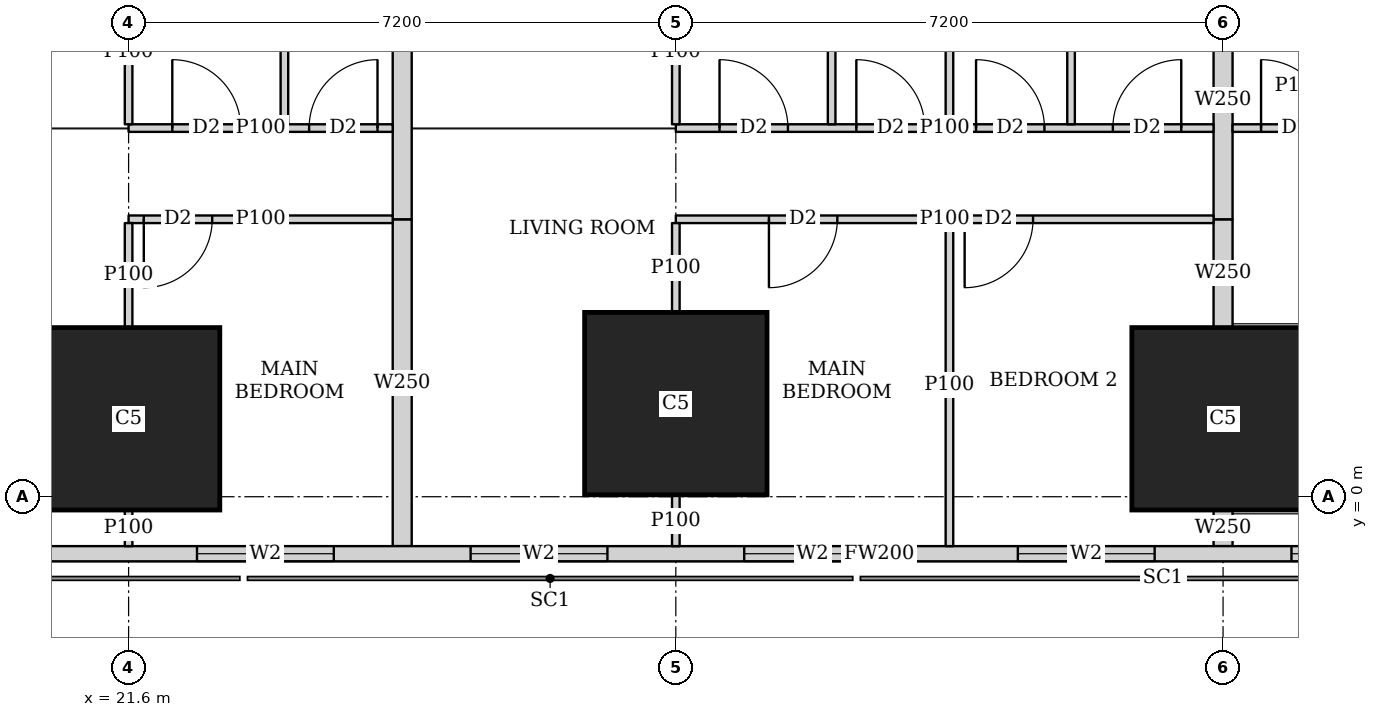
"""IFC4 building model, lengths in metres.
Left out: names, types, materials, properties, quantities, classifications, styles, units other than length and angle.
Written with IfcOpenShell. Run it as: python <this file> out.ifc"""

import sys

from ifc_helpers import new_model, si_unit, direction, frame, frame_2d, origin, origin_2d, place, context, subcontext, project, spatial, rectangle, extrude, element, fill, save


model = new_model("IFC4")
c1 = context("Model", 3, precision=1e-05, world=origin(), true_north=direction((0.0, 1.0)))
c2 = subcontext(c1, "Body", "Model", "MODEL_VIEW")
j1 = project(units=[si_unit("LENGTHUNIT", "METRE"), si_unit("PLANEANGLEUNIT", "RADIAN")], contexts=[c1])
p1 = place(None, origin())
s1 = spatial("IfcSite", under=j1, at=p1, CompositionType="ELEMENT")
p2 = place(p1, origin())
s2 = spatial("IfcBuilding", under=s1, at=p2, CompositionType="ELEMENT")
p3 = place(p2, frame((0.0, 0.0, 223.7)))
s3 = spatial("IfcBuildingStorey", under=s2, at=p3, CompositionType="ELEMENT", Elevation=223.7)
for number, where, z_axis, x_axis in (
    (1, (21.6, 1.025, 0.0), (0.0, 0.0, 1.0), (1.0, 0.0, 0.0)),
    (2, (28.8, 1.225, 0.0), (0.0, 0.0, 1.0), (1.0, 0.0, 0.0)),
    (3, (36.0, 1.025, 0.0), (0.0, 0.0, 1.0), (1.0, 0.0, 0.0)),
):
    element("IfcColumn", number, at=place(p3, frame(where, z_axis=z_axis, x_axis=x_axis)), inside=s3, PredefinedType="COLUMN", context=c2, shape_type="SweptSolid", body=[
        extrude(rectangle(XDim=2.4, YDim=2.4, at=origin_2d()), origin(), (0.0, 0.0, 1.0), 3.75),
    ])
p4 = place(p3, frame((14.563, -0.75, 0.0), z_axis=(0.0, 0.0, 1.0), x_axis=(1.0, 0.0, 0.0)))
e4 = element("IfcWall", 4, at=p4, inside=s3, PredefinedType="SOLIDWALL", context=c2, shape_type="SweptSolid", body=[
    extrude(rectangle(XDim=33.228, YDim=0.2, at=frame_2d((16.614, 0.0))), origin(), (0.0, 0.0, 1.0), 3.5),
])
p5 = place(p4, frame((2.319, 0.0, 0.9)))
e5 = element("IfcOpeningElement", 5, at=p5, cuts=e4, PredefinedType="OPENING", context=c2, shape_type="SweptSolid", body=[
    extrude(rectangle(XDim=2.4, YDim=1.5, at=frame_2d((1.2, 0.75))), frame((0.0, 0.11, 0.0), z_axis=(0.0, -1.0, 0.0), x_axis=(1.0, 0.0, 0.0)), (0.0, 0.0, 1.0), 0.22),
])
p6 = place(p4, frame((7.937, 0.0, 0.9)))
e6 = element("IfcOpeningElement", 6, at=p6, cuts=e4, PredefinedType="OPENING", context=c2, shape_type="SweptSolid", body=[
    extrude(rectangle(XDim=1.8, YDim=1.5, at=frame_2d((0.9, 0.75))), frame((0.0, 0.11, 0.0), z_axis=(0.0, -1.0, 0.0), x_axis=(1.0, 0.0, 0.0)), (0.0, 0.0, 1.0), 0.22),
])
p7 = place(p4, frame((11.537, 0.0, 0.9)))
e7 = element("IfcOpeningElement", 7, at=p7, cuts=e4, PredefinedType="OPENING", context=c2, shape_type="SweptSolid", body=[
    extrude(rectangle(XDim=1.8, YDim=1.5, at=frame_2d((0.9, 0.75))), frame((0.0, 0.11, 0.0), z_axis=(0.0, -1.0, 0.0), x_axis=(1.0, 0.0, 0.0)), (0.0, 0.0, 1.0), 0.22),
])
p8 = place(p4, frame((15.137, 0.0, 0.9)))
e8 = element("IfcOpeningElement", 8, at=p8, cuts=e4, PredefinedType="OPENING", context=c2, shape_type="SweptSolid", body=[
    extrude(rectangle(XDim=1.8, YDim=1.5, at=frame_2d((0.9, 0.75))), frame((0.0, 0.11, 0.0), z_axis=(0.0, -1.0, 0.0), x_axis=(1.0, 0.0, 0.0)), (0.0, 0.0, 1.0), 0.22),
])
p9 = place(p4, frame((18.737, 0.0, 0.9)))
e9 = element("IfcOpeningElement", 9, at=p9, cuts=e4, PredefinedType="OPENING", context=c2, shape_type="SweptSolid", body=[
    extrude(rectangle(XDim=1.8, YDim=1.5, at=frame_2d((0.9, 0.75))), frame((0.0, 0.11, 0.0), z_axis=(0.0, -1.0, 0.0), x_axis=(1.0, 0.0, 0.0)), (0.0, 0.0, 1.0), 0.22),
])
p10 = place(p4, frame((22.337, 0.0, 0.9)))
e10 = element("IfcOpeningElement", 10, at=p10, cuts=e4, PredefinedType="OPENING", context=c2, shape_type="SweptSolid", body=[
    extrude(rectangle(XDim=1.8, YDim=1.5, at=frame_2d((0.9, 0.75))), frame((0.0, 0.11, 0.0), z_axis=(0.0, -1.0, 0.0), x_axis=(1.0, 0.0, 0.0)), (0.0, 0.0, 1.0), 0.22),
])
p11 = place(p3, frame((33.68, 42.723, 0.0), z_axis=(0.0, 0.0, 1.0), x_axis=(0.185601160014, -0.982625162207, 0.0)))
e11 = element("IfcWall", 11, at=p11, inside=s3, PredefinedType="SOLIDWALL", context=c2, shape_type="SweptSolid", body=[
    extrude(rectangle(XDim=41.051, YDim=0.15, at=frame_2d((20.526, 0.0))), origin(), (0.0, 0.0, 1.0), 2.5),
])
p12 = place(p11, frame((16.123, 0.0, 0.0)))
e12 = element("IfcOpeningElement", 12, at=p12, cuts=e11, PredefinedType="OPENING", context=c2, shape_type="SweptSolid", body=[
    extrude(rectangle(XDim=1.0, YDim=2.1, at=frame_2d((0.5, 1.05))), frame((0.0, 0.085, 0.0), z_axis=(0.0, -1.0, 0.0), x_axis=(1.0, 0.0, 0.0)), (0.0, 0.0, 1.0), 0.17),
])
p13 = place(p11, frame((19.938, 0.0, 0.0)))
e13 = element("IfcOpeningElement", 13, at=p13, cuts=e11, PredefinedType="OPENING", context=c2, shape_type="SweptSolid", body=[
    extrude(rectangle(XDim=1.0, YDim=2.1, at=frame_2d((0.5, 1.05))), frame((0.0, 0.085, 0.0), z_axis=(0.0, -1.0, 0.0), x_axis=(1.0, 0.0, 0.0)), (0.0, 0.0, 1.0), 0.17),
])
p14 = place(p11, frame((30.902, 0.0, 0.0)))
e14 = element("IfcOpeningElement", 14, at=p14, cuts=e11, PredefinedType="OPENING", context=c2, shape_type="SweptSolid", body=[
    extrude(rectangle(XDim=1.0, YDim=2.1, at=frame_2d((0.5, 1.05))), frame((0.0, 0.085, 0.0), z_axis=(0.0, -1.0, 0.0), x_axis=(1.0, 0.0, 0.0)), (0.0, 0.0, 1.0), 0.17),
])
p15 = place(p3, frame((25.075, 3.65, 0.0), z_axis=(0.0, 0.0, 1.0), x_axis=(-1.0, 0.0, 0.0)))
e15 = element("IfcWall", 15, at=p15, inside=s3, PredefinedType="PARTITIONING", context=c2, shape_type="SweptSolid", body=[
    extrude(rectangle(XDim=3.475, YDim=0.1, at=frame_2d((1.737, 0.0))), origin(), (0.0, 0.0, 1.0), 3.5),
])
p16 = place(p15, frame((2.375, 0.0, 0.0)))
e16 = element("IfcOpeningElement", 16, at=p16, cuts=e15, PredefinedType="OPENING", context=c2, shape_type="SweptSolid", body=[
    extrude(rectangle(XDim=0.9, YDim=2.1, at=frame_2d((0.45, 1.05))), frame((0.0, 0.06, 0.0), z_axis=(0.0, -1.0, 0.0), x_axis=(1.0, 0.0, 0.0)), (0.0, 0.0, 1.0), 0.12),
])
p17 = place(p3, frame((25.075, 4.85, 0.0), z_axis=(0.0, 0.0, 1.0), x_axis=(-1.0, 0.0, 0.0)))
e17 = element("IfcWall", 17, at=p17, inside=s3, PredefinedType="PARTITIONING", context=c2, shape_type="SweptSolid", body=[
    extrude(rectangle(XDim=3.475, YDim=0.1, at=frame_2d((1.737, 0.0))), origin(), (0.0, 0.0, 1.0), 3.5),
])
p18 = place(p17, frame((2.0, 0.0, 0.0)))
e18 = element("IfcOpeningElement", 18, at=p18, cuts=e17, PredefinedType="OPENING", context=c2, shape_type="SweptSolid", body=[
    extrude(rectangle(XDim=0.9, YDim=2.1, at=frame_2d((0.45, 1.05))), frame((0.0, 0.06, 0.0), z_axis=(0.0, -1.0, 0.0), x_axis=(1.0, 0.0, 0.0)), (0.0, 0.0, 1.0), 0.12),
])
p19 = place(p17, frame((0.2, 0.0, 0.0)))
e19 = element("IfcOpeningElement", 19, at=p19, cuts=e17, PredefinedType="OPENING", context=c2, shape_type="SweptSolid", body=[
    extrude(rectangle(XDim=0.9, YDim=2.1, at=frame_2d((0.45, 1.05))), frame((0.0, 0.06, 0.0), z_axis=(0.0, -1.0, 0.0), x_axis=(1.0, 0.0, 0.0)), (0.0, 0.0, 1.0), 0.12),
])
p20 = place(p3, frame((21.6, -0.65, 0.0), z_axis=(0.0, 0.0, 1.0), x_axis=(0.0, 1.0, 0.0)))
e20 = element("IfcWall", 20, at=p20, inside=s3, PredefinedType="PARTITIONING", context=c2, shape_type="SweptSolid", body=[
    extrude(rectangle(XDim=0.474, YDim=0.1, at=frame_2d((0.237, 0.0))), origin(), (0.0, 0.0, 1.0), 3.5),
])
p21 = place(p3, frame((21.6, 2.226, 0.0), z_axis=(0.0, 0.0, 1.0), x_axis=(0.0, 1.0, 0.0)))
e21 = element("IfcWall", 21, at=p21, inside=s3, PredefinedType="PARTITIONING", context=c2, shape_type="SweptSolid", body=[
    extrude(rectangle(XDim=1.374, YDim=0.1, at=frame_2d((0.687, 0.0))), origin(), (0.0, 0.0, 1.0), 3.5),
])
p22 = place(p3, frame((21.6, 4.9, 0.0), z_axis=(0.0, 0.0, 1.0), x_axis=(0.0, 1.0, 0.0)))
e22 = element("IfcWall", 22, at=p22, inside=s3, PredefinedType="PARTITIONING", context=c2, shape_type="SweptSolid", body=[
    extrude(rectangle(XDim=1.899, YDim=0.1, at=frame_2d((0.95, 0.0))), origin(), (0.0, 0.0, 1.0), 3.5),
])
p23 = place(p3, frame((23.65, 4.9, 0.0), z_axis=(0.0, 0.0, 1.0), x_axis=(0.0, 1.0, 0.0)))
e23 = element("IfcWall", 23, at=p23, inside=s3, PredefinedType="PARTITIONING", context=c2, shape_type="SweptSolid", body=[
    extrude(rectangle(XDim=3.525, YDim=0.1, at=frame_2d((1.763, 0.0))), origin(), (0.0, 0.0, 1.0), 3.5),
])
p24 = place(p3, frame((35.875, 3.65, 0.0), z_axis=(0.0, 0.0, 1.0), x_axis=(-1.0, 0.0, 0.0)))
e24 = element("IfcWall", 24, at=p24, inside=s3, PredefinedType="PARTITIONING", context=c2, shape_type="SweptSolid", body=[
    extrude(rectangle(XDim=7.075, YDim=0.1, at=frame_2d((3.538, 0.0))), origin(), (0.0, 0.0, 1.0), 3.5),
])
p25 = place(p24, frame((4.95, 0.0, 0.0)))
e25 = element("IfcOpeningElement", 25, at=p25, cuts=e24, PredefinedType="OPENING", context=c2, shape_type="SweptSolid", body=[
    extrude(rectangle(XDim=0.9, YDim=2.1, at=frame_2d((0.45, 1.05))), frame((0.0, 0.06, 0.0), z_axis=(0.0, -1.0, 0.0), x_axis=(1.0, 0.0, 0.0)), (0.0, 0.0, 1.0), 0.12),
])
p26 = place(p24, frame((2.375, 0.0, 0.0)))
e26 = element("IfcOpeningElement", 26, at=p26, cuts=e24, PredefinedType="OPENING", context=c2, shape_type="SweptSolid", body=[
    extrude(rectangle(XDim=0.9, YDim=2.1, at=frame_2d((0.45, 1.05))), frame((0.0, 0.06, 0.0), z_axis=(0.0, -1.0, 0.0), x_axis=(1.0, 0.0, 0.0)), (0.0, 0.0, 1.0), 0.12),
])
p27 = place(p3, frame((35.875, 4.85, 0.0), z_axis=(0.0, 0.0, 1.0), x_axis=(-1.0, 0.0, 0.0)))
e27 = element("IfcWall", 27, at=p27, inside=s3, PredefinedType="PARTITIONING", context=c2, shape_type="SweptSolid", body=[
    extrude(rectangle(XDim=7.075, YDim=0.1, at=frame_2d((3.538, 0.0))), origin(), (0.0, 0.0, 1.0), 3.5),
])
p28 = place(p27, frame((5.6, 0.0, 0.0)))
e28 = element("IfcOpeningElement", 28, at=p28, cuts=e27, PredefinedType="OPENING", context=c2, shape_type="SweptSolid", body=[
    extrude(rectangle(XDim=0.9, YDim=2.1, at=frame_2d((0.45, 1.05))), frame((0.0, 0.06, 0.0), z_axis=(0.0, -1.0, 0.0), x_axis=(1.0, 0.0, 0.0)), (0.0, 0.0, 1.0), 0.12),
])
p29 = place(p27, frame((2.225, 0.0, 0.0)))
e29 = element("IfcOpeningElement", 29, at=p29, cuts=e27, PredefinedType="OPENING", context=c2, shape_type="SweptSolid", body=[
    extrude(rectangle(XDim=0.9, YDim=2.1, at=frame_2d((0.45, 1.05))), frame((0.0, 0.06, 0.0), z_axis=(0.0, -1.0, 0.0), x_axis=(1.0, 0.0, 0.0)), (0.0, 0.0, 1.0), 0.12),
])
p30 = place(p27, frame((3.8, 0.0, 0.0)))
e30 = element("IfcOpeningElement", 30, at=p30, cuts=e27, PredefinedType="OPENING", context=c2, shape_type="SweptSolid", body=[
    extrude(rectangle(XDim=0.9, YDim=2.1, at=frame_2d((0.45, 1.05))), frame((0.0, 0.06, 0.0), z_axis=(0.0, -1.0, 0.0), x_axis=(1.0, 0.0, 0.0)), (0.0, 0.0, 1.0), 0.12),
])
p31 = place(p27, frame((0.425, 0.0, 0.0)))
e31 = element("IfcOpeningElement", 31, at=p31, cuts=e27, PredefinedType="OPENING", context=c2, shape_type="SweptSolid", body=[
    extrude(rectangle(XDim=0.9, YDim=2.1, at=frame_2d((0.45, 1.05))), frame((0.0, 0.06, 0.0), z_axis=(0.0, -1.0, 0.0), x_axis=(1.0, 0.0, 0.0)), (0.0, 0.0, 1.0), 0.12),
])
p32 = place(p3, frame((28.8, -0.65, 0.0), z_axis=(0.0, 0.0, 1.0), x_axis=(0.0, 1.0, 0.0)))
e32 = element("IfcWall", 32, at=p32, inside=s3, PredefinedType="PARTITIONING", context=c2, shape_type="SweptSolid", body=[
    extrude(rectangle(XDim=0.674, YDim=0.1, at=frame_2d((0.337, 0.0))), origin(), (0.0, 0.0, 1.0), 3.5),
])
p33 = place(p3, frame((28.8, 2.426, 0.0), z_axis=(0.0, 0.0, 1.0), x_axis=(0.0, 1.0, 0.0)))
e33 = element("IfcWall", 33, at=p33, inside=s3, PredefinedType="PARTITIONING", context=c2, shape_type="SweptSolid", body=[
    extrude(rectangle(XDim=1.174, YDim=0.1, at=frame_2d((0.587, 0.0))), origin(), (0.0, 0.0, 1.0), 3.5),
])
p34 = place(p3, frame((32.4, -0.65, 0.0), z_axis=(0.0, 0.0, 1.0), x_axis=(0.0, 1.0, 0.0)))
e34 = element("IfcWall", 34, at=p34, inside=s3, PredefinedType="PARTITIONING", context=c2, shape_type="SweptSolid", body=[
    extrude(rectangle(XDim=4.25, YDim=0.1, at=frame_2d((2.125, 0.0))), origin(), (0.0, 0.0, 1.0), 2.05),
])
p35 = place(p3, frame((28.8, 4.9, 0.0), z_axis=(0.0, 0.0, 1.0), x_axis=(0.0, 1.0, 0.0)))
e35 = element("IfcWall", 35, at=p35, inside=s3, PredefinedType="PARTITIONING", context=c2, shape_type="SweptSolid", body=[
    extrude(rectangle(XDim=1.899, YDim=0.1, at=frame_2d((0.95, 0.0))), origin(), (0.0, 0.0, 1.0), 3.5),
])
for number, where, z_axis, x_axis in (
    (36, (32.4, 4.9, 0.0), (0.0, 0.0, 1.0), (0.0, 1.0, 0.0)),
    (37, (30.85, 4.9, 0.0), (0.0, 0.0, 1.0), (0.0, 1.0, 0.0)),
    (38, (34.0, 4.9, 0.0), (0.0, 0.0, 1.0), (0.0, 1.0, 0.0)),
):
    element("IfcWall", number, at=place(p3, frame(where, z_axis=z_axis, x_axis=x_axis)), inside=s3, PredefinedType="PARTITIONING", context=c2, shape_type="SweptSolid", body=[
        extrude(rectangle(XDim=3.525, YDim=0.1, at=frame_2d((1.763, 0.0))), origin(), (0.0, 0.0, 1.0), 3.5),
    ])
p36 = place(p3, frame((25.2, -0.65, 0.0), z_axis=(0.0, 0.0, 1.0), x_axis=(0.0, 1.0, 0.0)))
e39 = element("IfcWall", 39, at=p36, inside=s3, PredefinedType="SOLIDWALL", context=c2, shape_type="SweptSolid", body=[
    extrude(rectangle(XDim=4.3, YDim=0.25, at=frame_2d((2.15, 0.0))), origin(), (0.0, 0.0, 1.0), 2.05),
])
p37 = place(p3, frame((25.2, 3.65, 0.0), z_axis=(0.0, 0.0, 1.0), x_axis=(0.0, 1.0, 0.0)))
e40 = element("IfcWall", 40, at=p37, inside=s3, PredefinedType="SOLIDWALL", context=c2, shape_type="SweptSolid", body=[
    extrude(rectangle(XDim=4.775, YDim=0.25, at=frame_2d((2.388, 0.0))), origin(), (0.0, 0.0, 1.0), 3.5),
])
p38 = place(p3, frame((37.89, 4.85, 0.0), z_axis=(0.0, 0.0, 1.0), x_axis=(-1.0, 0.0, 0.0)))
e41 = element("IfcWall", 41, at=p38, inside=s3, PredefinedType="PARTITIONING", context=c2, shape_type="SweptSolid", body=[
    extrude(rectangle(XDim=1.765, YDim=0.1, at=frame_2d((0.882, 0.0))), origin(), (0.0, 0.0, 1.0), 3.5),
])
p39 = place(p38, frame((0.49, 0.0, 0.0)))
e42 = element("IfcOpeningElement", 42, at=p39, cuts=e41, PredefinedType="OPENING", context=c2, shape_type="SweptSolid", body=[
    extrude(rectangle(XDim=0.9, YDim=2.1, at=frame_2d((0.45, 1.05))), frame((0.0, 0.06, 0.0), z_axis=(0.0, -1.0, 0.0), x_axis=(1.0, 0.0, 0.0)), (0.0, 0.0, 1.0), 0.12),
])
p40 = place(p3, frame((36.0, -0.65, 0.0), z_axis=(0.0, 0.0, 1.0), x_axis=(0.0, 1.0, 0.0)))
e43 = element("IfcWall", 43, at=p40, inside=s3, PredefinedType="SOLIDWALL", context=c2, shape_type="SweptSolid", body=[
    extrude(rectangle(XDim=0.474, YDim=0.25, at=frame_2d((0.237, 0.0))), origin(), (0.0, 0.0, 1.0), 2.05),
])
p41 = place(p3, frame((36.0, 2.226, 0.0), z_axis=(0.0, 0.0, 1.0), x_axis=(0.0, 1.0, 0.0)))
e44 = element("IfcWall", 44, at=p41, inside=s3, PredefinedType="SOLIDWALL", context=c2, shape_type="SweptSolid", body=[
    extrude(rectangle(XDim=1.424, YDim=0.25, at=frame_2d((0.712, 0.0))), origin(), (0.0, 0.0, 1.0), 2.05),
])
p42 = place(p3, frame((36.0, 3.65, 0.0), z_axis=(0.0, 0.0, 1.0), x_axis=(0.0, 1.0, 0.0)))
e45 = element("IfcWall", 45, at=p42, inside=s3, PredefinedType="SOLIDWALL", context=c2, shape_type="SweptSolid", body=[
    extrude(rectangle(XDim=3.149, YDim=0.25, at=frame_2d((1.575, 0.0))), origin(), (0.0, 0.0, 1.0), 3.5),
])
p43 = place(p6, origin())
e46 = element("IfcWindow", 46, at=p43, inside=s3, PartitioningType="SINGLE_PANEL", PredefinedType="WINDOW", context=c2, shape_type="SweptSolid", body=[
    extrude(rectangle(XDim=1.8, YDim=1.5, at=frame_2d((0.9, 0.75))), frame((0.0, 0.03, 0.0), z_axis=(0.0, -1.0, 0.0), x_axis=(1.0, 0.0, 0.0)), (0.0, 0.0, 1.0), 0.06),
])
fill(e6, e46)
p44 = place(p7, origin())
e47 = element("IfcWindow", 47, at=p44, inside=s3, PartitioningType="SINGLE_PANEL", PredefinedType="WINDOW", context=c2, shape_type="SweptSolid", body=[
    extrude(rectangle(XDim=1.8, YDim=1.5, at=frame_2d((0.9, 0.75))), frame((0.0, 0.03, 0.0), z_axis=(0.0, -1.0, 0.0), x_axis=(1.0, 0.0, 0.0)), (0.0, 0.0, 1.0), 0.06),
])
fill(e7, e47)
p45 = place(p8, origin())
e48 = element("IfcWindow", 48, at=p45, inside=s3, PartitioningType="SINGLE_PANEL", PredefinedType="WINDOW", context=c2, shape_type="SweptSolid", body=[
    extrude(rectangle(XDim=1.8, YDim=1.5, at=frame_2d((0.9, 0.75))), frame((0.0, 0.03, 0.0), z_axis=(0.0, -1.0, 0.0), x_axis=(1.0, 0.0, 0.0)), (0.0, 0.0, 1.0), 0.06),
])
fill(e8, e48)
p46 = place(p9, origin())
e49 = element("IfcWindow", 49, at=p46, inside=s3, PartitioningType="SINGLE_PANEL", PredefinedType="WINDOW", context=c2, shape_type="SweptSolid", body=[
    extrude(rectangle(XDim=1.8, YDim=1.5, at=frame_2d((0.9, 0.75))), frame((0.0, 0.03, 0.0), z_axis=(0.0, -1.0, 0.0), x_axis=(1.0, 0.0, 0.0)), (0.0, 0.0, 1.0), 0.06),
])
fill(e9, e49)
p47 = place(p10, origin())
e50 = element("IfcWindow", 50, at=p47, inside=s3, PartitioningType="SINGLE_PANEL", PredefinedType="WINDOW", context=c2, shape_type="SweptSolid", body=[
    extrude(rectangle(XDim=1.8, YDim=1.5, at=frame_2d((0.9, 0.75))), frame((0.0, 0.03, 0.0), z_axis=(0.0, -1.0, 0.0), x_axis=(1.0, 0.0, 0.0)), (0.0, 0.0, 1.0), 0.06),
])
fill(e10, e50)
p48 = place(p16, origin())
e51 = element("IfcDoor", 51, at=p48, inside=s3, OperationType="SINGLE_SWING_RIGHT", PredefinedType="DOOR", context=c2, shape_type="SweptSolid", body=[
    extrude(rectangle(XDim=0.9, YDim=2.1, at=frame_2d((0.45, 1.05))), frame((0.0, 0.025, 0.0), z_axis=(0.0, -1.0, 0.0), x_axis=(1.0, 0.0, 0.0)), (0.0, 0.0, 1.0), 0.05),
])
fill(e16, e51)
p49 = place(p18, origin())
e52 = element("IfcDoor", 52, at=p49, inside=s3, OperationType="SINGLE_SWING_LEFT", PredefinedType="DOOR", context=c2, shape_type="SweptSolid", body=[
    extrude(rectangle(XDim=0.9, YDim=2.1, at=frame_2d((0.45, 1.05))), frame((0.0, 0.025, 0.0), z_axis=(0.0, -1.0, 0.0), x_axis=(1.0, 0.0, 0.0)), (0.0, 0.0, 1.0), 0.05),
])
fill(e18, e52)
p50 = place(p19, origin())
e53 = element("IfcDoor", 53, at=p50, inside=s3, OperationType="SINGLE_SWING_RIGHT", PredefinedType="DOOR", context=c2, shape_type="SweptSolid", body=[
    extrude(rectangle(XDim=0.9, YDim=2.1, at=frame_2d((0.45, 1.05))), frame((0.0, 0.025, 0.0), z_axis=(0.0, -1.0, 0.0), x_axis=(1.0, 0.0, 0.0)), (0.0, 0.0, 1.0), 0.05),
])
fill(e19, e53)
p51 = place(p25, origin())
e54 = element("IfcDoor", 54, at=p51, inside=s3, OperationType="SINGLE_SWING_RIGHT", PredefinedType="DOOR", context=c2, shape_type="SweptSolid", body=[
    extrude(rectangle(XDim=0.9, YDim=2.1, at=frame_2d((0.45, 1.05))), frame((0.0, 0.025, 0.0), z_axis=(0.0, -1.0, 0.0), x_axis=(1.0, 0.0, 0.0)), (0.0, 0.0, 1.0), 0.05),
])
fill(e25, e54)
p52 = place(p26, origin())
e55 = element("IfcDoor", 55, at=p52, inside=s3, OperationType="SINGLE_SWING_RIGHT", PredefinedType="DOOR", context=c2, shape_type="SweptSolid", body=[
    extrude(rectangle(XDim=0.9, YDim=2.1, at=frame_2d((0.45, 1.05))), frame((0.0, 0.025, 0.0), z_axis=(0.0, -1.0, 0.0), x_axis=(1.0, 0.0, 0.0)), (0.0, 0.0, 1.0), 0.05),
])
fill(e26, e55)
p53 = place(p28, origin())
e56 = element("IfcDoor", 56, at=p53, inside=s3, OperationType="SINGLE_SWING_LEFT", PredefinedType="DOOR", context=c2, shape_type="SweptSolid", body=[
    extrude(rectangle(XDim=0.9, YDim=2.1, at=frame_2d((0.45, 1.05))), frame((0.0, 0.025, 0.0), z_axis=(0.0, -1.0, 0.0), x_axis=(1.0, 0.0, 0.0)), (0.0, 0.0, 1.0), 0.05),
])
fill(e28, e56)
p54 = place(p29, origin())
e57 = element("IfcDoor", 57, at=p54, inside=s3, OperationType="SINGLE_SWING_LEFT", PredefinedType="DOOR", context=c2, shape_type="SweptSolid", body=[
    extrude(rectangle(XDim=0.9, YDim=2.1, at=frame_2d((0.45, 1.05))), frame((0.0, 0.025, 0.0), z_axis=(0.0, -1.0, 0.0), x_axis=(1.0, 0.0, 0.0)), (0.0, 0.0, 1.0), 0.05),
])
fill(e29, e57)
p55 = place(p30, origin())
e58 = element("IfcDoor", 58, at=p55, inside=s3, OperationType="SINGLE_SWING_LEFT", PredefinedType="DOOR", context=c2, shape_type="SweptSolid", body=[
    extrude(rectangle(XDim=0.9, YDim=2.1, at=frame_2d((0.45, 1.05))), frame((0.0, 0.025, 0.0), z_axis=(0.0, -1.0, 0.0), x_axis=(1.0, 0.0, 0.0)), (0.0, 0.0, 1.0), 0.05),
])
fill(e30, e58)
p56 = place(p31, origin())
e59 = element("IfcDoor", 59, at=p56, inside=s3, OperationType="SINGLE_SWING_RIGHT", PredefinedType="DOOR", context=c2, shape_type="SweptSolid", body=[
    extrude(rectangle(XDim=0.9, YDim=2.1, at=frame_2d((0.45, 1.05))), frame((0.0, 0.025, 0.0), z_axis=(0.0, -1.0, 0.0), x_axis=(1.0, 0.0, 0.0)), (0.0, 0.0, 1.0), 0.05),
])
fill(e31, e59)
p57 = place(p39, origin())
e60 = element("IfcDoor", 60, at=p57, inside=s3, OperationType="SINGLE_SWING_LEFT", PredefinedType="DOOR", context=c2, shape_type="SweptSolid", body=[
    extrude(rectangle(XDim=0.9, YDim=2.1, at=frame_2d((0.45, 1.05))), frame((0.0, 0.025, 0.0), z_axis=(0.0, -1.0, 0.0), x_axis=(1.0, 0.0, 0.0)), (0.0, 0.0, 1.0), 0.05),
])
fill(e42, e60)
save(model, sys.argv[1])
